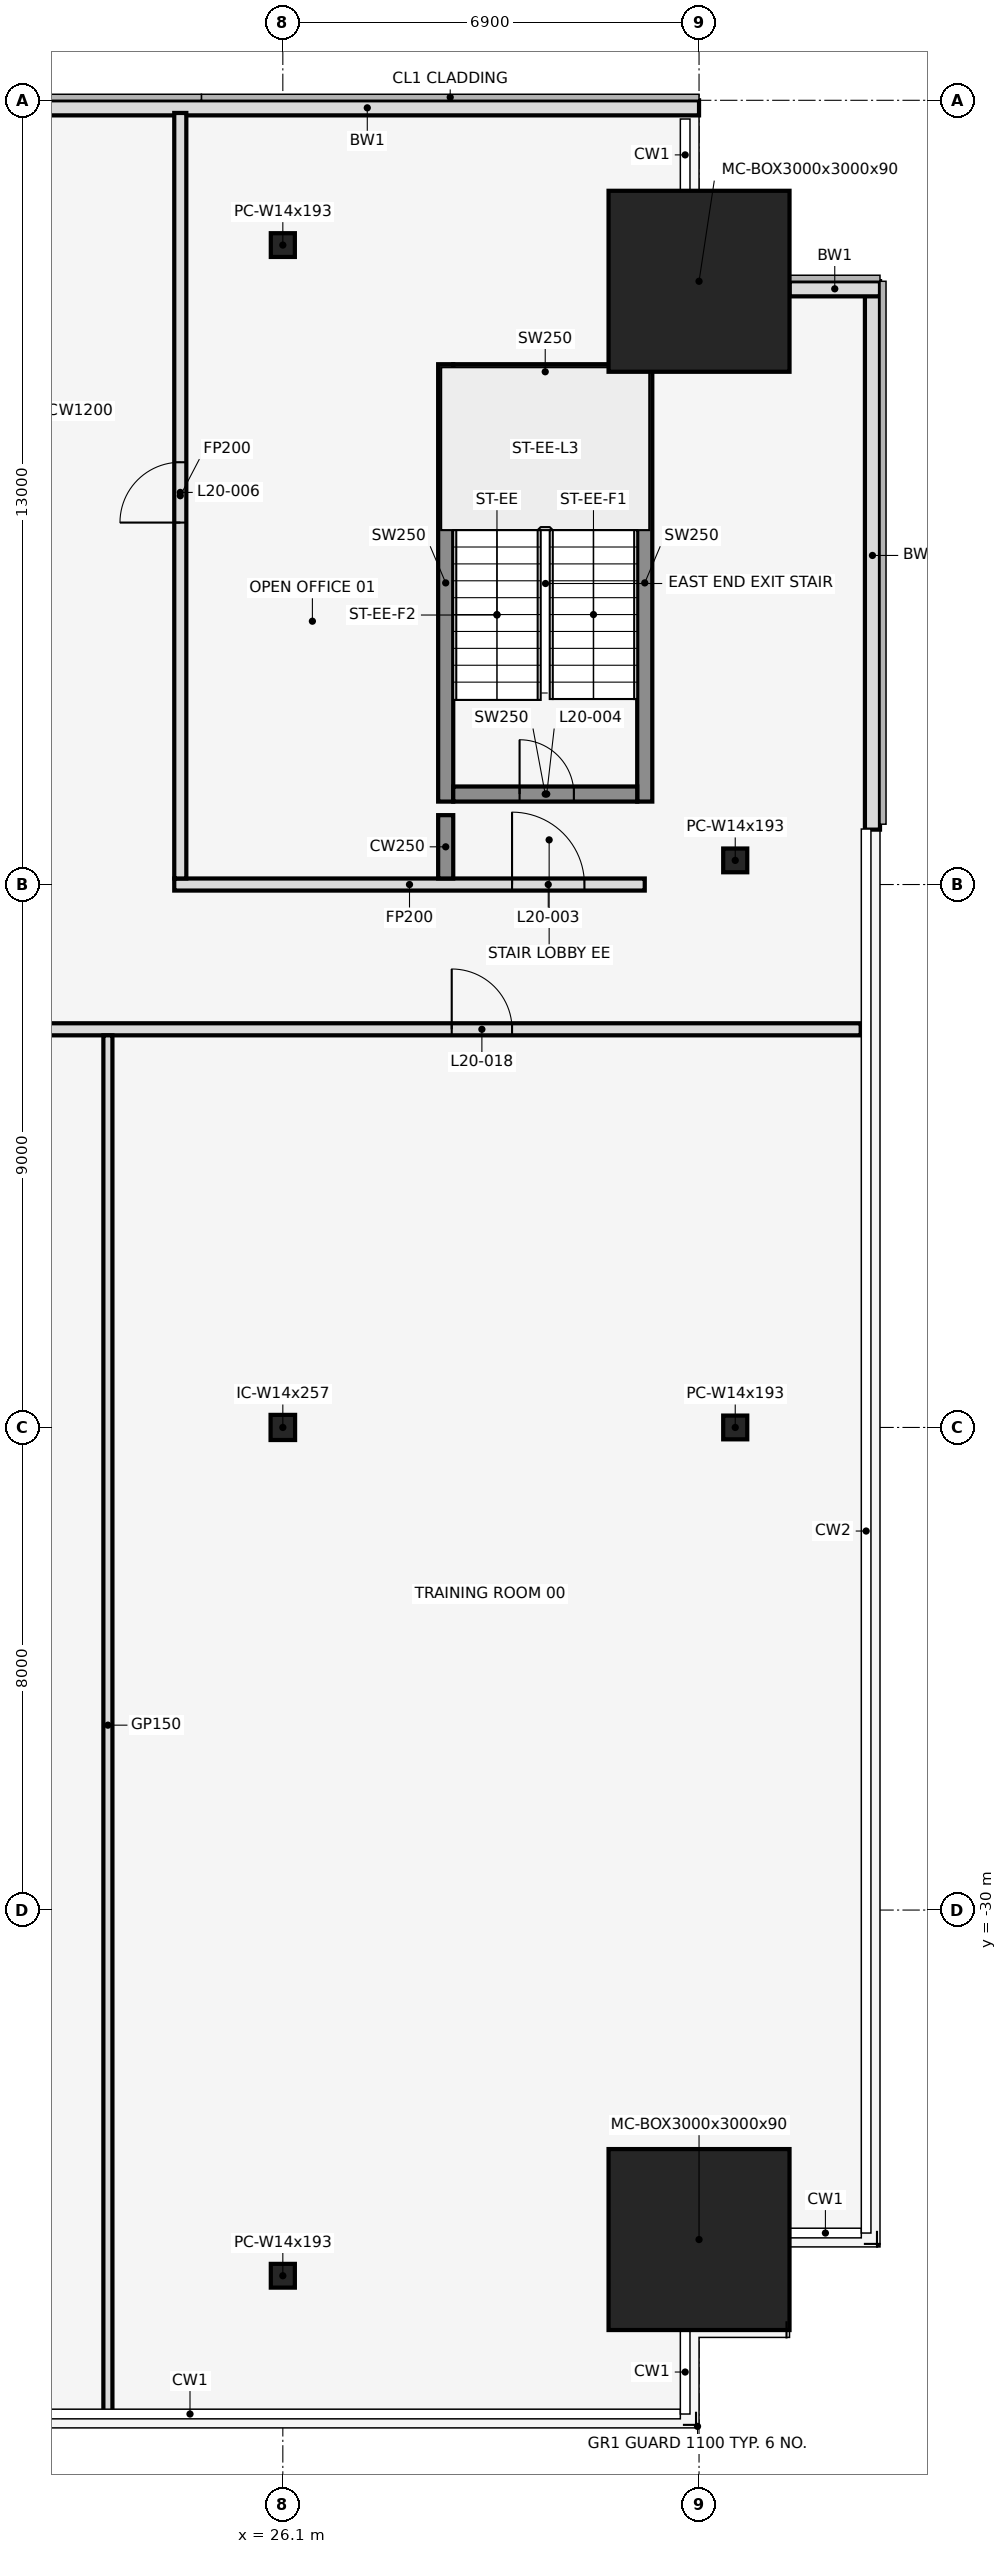
"""IFC4 building model, lengths in metres.
Left out: names, types, materials, properties, quantities, classifications, styles, units other than length and angle.
Written with IfcOpenShell. Run it as: python <this file> out.ifc"""

import sys

from ifc_helpers import new_model, si_unit, direction, frame, frame_2d, origin, origin_2d, place, context, subcontext, project, spatial, rectangle, hollow_rectangle, i_section, extrude, element, fill, save


model = new_model("IFC4")
c1 = context("Model", 3, precision=1e-05, world=origin(), true_north=direction((0.0, 1.0)))
c2 = subcontext(c1, "Body", "Model", "MODEL_VIEW")
j1 = project(units=[si_unit("LENGTHUNIT", "METRE"), si_unit("PLANEANGLEUNIT", "RADIAN")], contexts=[c1])
p1 = place(None, origin())
s1 = spatial("IfcSite", under=j1, at=p1, CompositionType="ELEMENT")
p2 = place(p1, origin())
s2 = spatial("IfcBuilding", under=s1, at=p2, CompositionType="ELEMENT")
p3 = place(p2, frame((0.0, 0.0, 98.1)))
s3 = spatial("IfcBuildingStorey", under=s2, at=p3, CompositionType="ELEMENT", Elevation=98.1)
for number, where, z_axis, x_axis in (
    (1, (26.1, -36.062, 0.0), (0.0, 0.0, 1.0), (1.0, 0.0, 0.0)),
    (2, (26.1, -2.4, 0.0), (0.0, 0.0, 1.0), (1.0, 0.0, 0.0)),
):
    element("IfcColumn", number, at=place(p3, frame(where, z_axis=z_axis, x_axis=x_axis)), inside=s3, PredefinedType="COLUMN", context=c2, shape_type="SweptSolid", body=[
        extrude(i_section(OverallWidth=0.399, OverallDepth=0.394, WebThickness=0.023, FlangeThickness=0.037, at=origin_2d()), origin(), (0.0, 0.0, 1.0), 4.1),
    ])
for number, where, z_axis, x_axis in (
    (3, (33.0, -35.462, 0.0), (0.0, 0.0, 1.0), (1.0, 0.0, 0.0)),
    (4, (33.0, -3.0, 0.0), (0.0, 0.0, 1.0), (1.0, 0.0, 0.0)),
):
    element("IfcColumn", number, at=place(p3, frame(where, z_axis=z_axis, x_axis=x_axis)), inside=s3, PredefinedType="COLUMN", context=c2, shape_type="SweptSolid", body=[
        extrude(hollow_rectangle(XDim=3.0, YDim=3.0, WallThickness=0.09, at=origin_2d()), origin(), (0.0, 0.0, 1.0), 4.1),
    ])
for number, where, z_axis, x_axis in (
    (5, (33.6, -12.6, 0.0), (0.0, 0.0, 1.0), (1.0, 0.0, 0.0)),
    (6, (33.6, -22.0, 0.0), (0.0, 0.0, 1.0), (1.0, 0.0, 0.0)),
):
    element("IfcColumn", number, at=place(p3, frame(where, z_axis=z_axis, x_axis=x_axis)), inside=s3, PredefinedType="COLUMN", context=c2, shape_type="SweptSolid", body=[
        extrude(i_section(OverallWidth=0.399, OverallDepth=0.394, WebThickness=0.023, FlangeThickness=0.037, at=origin_2d()), origin(), (0.0, 0.0, 1.0), 4.1),
    ])
p4 = place(p3, frame((26.1, -22.0, 0.0), z_axis=(0.0, 0.0, 1.0), x_axis=(1.0, 0.0, 0.0)))
e7 = element("IfcColumn", 7, at=p4, inside=s3, PredefinedType="COLUMN", context=c2, shape_type="SweptSolid", body=[
    extrude(i_section(OverallWidth=0.406, OverallDepth=0.417, WebThickness=0.03, FlangeThickness=0.048, at=origin_2d()), origin(), (0.0, 0.0, 1.0), 4.1),
])
p5 = place(p3, frame((33.0, -0.125, 0.0), z_axis=(0.0, 0.0, 1.0), x_axis=(-1.0, 0.0, 0.0)))
e8 = element("IfcWall", 8, at=p5, inside=s3, PredefinedType="STANDARD", context=c2, shape_type="SweptSolid", body=[
    extrude(rectangle(XDim=11.0, YDim=0.25, at=frame_2d((5.5, 0.0))), origin(), (0.0, 0.0, 1.0), 3.95),
])
p6 = place(p3, frame((35.875, -12.09, 0.0), z_axis=(0.0, 0.0, 1.0), x_axis=(0.0, 1.0, 0.0)))
e9 = element("IfcWall", 9, at=p6, inside=s3, PredefinedType="STANDARD", context=c2, shape_type="SweptSolid", body=[
    extrude(rectangle(XDim=9.09, YDim=0.25, at=frame_2d((4.545, 0.0))), origin(), (0.0, 0.0, 1.0), 3.95),
])
p7 = place(p3, frame((36.0, -3.125, 0.0), z_axis=(0.0, 0.0, 1.0), x_axis=(-1.0, 0.0, 0.0)))
e10 = element("IfcWall", 10, at=p7, inside=s3, PredefinedType="STANDARD", context=c2, shape_type="SweptSolid", body=[
    extrude(rectangle(XDim=1.5, YDim=0.25, at=frame_2d((0.75, 0.0))), origin(), (0.0, 0.0, 1.0), 3.95),
])
for number, where, z_axis, x_axis in (
    (11, (28.8, -11.625, 0.0), (0.0, 0.0, 1.0), (0.0, 1.0, 0.0)),
    (12, (32.1, -11.625, 0.0), (0.0, 0.0, 1.0), (0.0, 1.0, 0.0)),
):
    element("IfcWall", number, at=place(p3, frame(where, z_axis=z_axis, x_axis=x_axis)), inside=s3, PredefinedType="SHEAR", context=c2, shape_type="SweptSolid", body=[
        extrude(rectangle(XDim=7.25, YDim=0.25, at=frame_2d((3.625, 0.0))), origin(), (0.0, 0.0, 1.0), 4.1),
    ])
p8 = place(p3, frame((28.925, -11.5, 0.0), z_axis=(0.0, 0.0, 1.0), x_axis=(1.0, 0.0, 0.0)))
e13 = element("IfcWall", 13, at=p8, inside=s3, PredefinedType="SHEAR", context=c2, shape_type="SweptSolid", body=[
    extrude(rectangle(XDim=3.05, YDim=0.25, at=frame_2d((1.525, 0.0))), origin(), (0.0, 0.0, 1.0), 4.1),
])
p9 = place(p8, frame((1.1, 0.0, 0.0)))
e14 = element("IfcOpeningElement", 14, at=p9, cuts=e13, PredefinedType="OPENING", context=c2, shape_type="SweptSolid", body=[
    extrude(rectangle(XDim=0.9, YDim=2.1, at=frame_2d((0.45, 1.05))), frame((0.0, 0.137, 0.0), z_axis=(0.0, -1.0, 0.0), x_axis=(1.0, 0.0, 0.0)), (0.0, 0.0, 1.0), 0.274),
])
p10 = place(p3, frame((28.925, -4.5, 0.0), z_axis=(0.0, 0.0, 1.0), x_axis=(1.0, 0.0, 0.0)))
e15 = element("IfcWall", 15, at=p10, inside=s3, PredefinedType="SHEAR", context=c2, shape_type="SweptSolid", body=[
    extrude(rectangle(XDim=3.05, YDim=0.25, at=frame_2d((1.525, 0.0))), origin(), (0.0, 0.0, 1.0), 4.1),
])
p11 = place(p3, frame((-35.68, -15.4, 0.0), z_axis=(0.0, 0.0, 1.0), x_axis=(1.0, 0.0, 0.0)))
e16 = element("IfcWall", 16, at=p11, inside=s3, PredefinedType="PARTITIONING", context=c2, shape_type="SweptSolid", body=[
    extrude(rectangle(XDim=71.36, YDim=0.2, at=frame_2d((35.68, 0.0))), origin(), (0.0, 0.0, 1.0), 3.018),
])
p12 = place(p11, frame((2.8, 0.0, 0.0)))
e17 = element("IfcOpeningElement", 17, at=p12, cuts=e16, PredefinedType="OPENING", context=c2, shape_type="SweptSolid", body=[
    extrude(rectangle(XDim=1.0, YDim=2.1, at=frame_2d((0.5, 1.05))), frame((0.0, 0.112, 0.0), z_axis=(0.0, -1.0, 0.0), x_axis=(1.0, 0.0, 0.0)), (0.0, 0.0, 1.0), 0.224),
])
p13 = place(p11, frame((7.58, 0.0, 0.0)))
e18 = element("IfcOpeningElement", 18, at=p13, cuts=e16, PredefinedType="OPENING", context=c2, shape_type="SweptSolid", body=[
    extrude(rectangle(XDim=1.0, YDim=2.1, at=frame_2d((0.5, 1.05))), frame((0.0, 0.112, 0.0), z_axis=(0.0, -1.0, 0.0), x_axis=(1.0, 0.0, 0.0)), (0.0, 0.0, 1.0), 0.224),
])
p14 = place(p11, frame((13.48, 0.0, 0.0)))
e19 = element("IfcOpeningElement", 19, at=p14, cuts=e16, PredefinedType="OPENING", context=c2, shape_type="SweptSolid", body=[
    extrude(rectangle(XDim=1.0, YDim=2.1, at=frame_2d((0.5, 1.05))), frame((0.0, 0.112, 0.0), z_axis=(0.0, -1.0, 0.0), x_axis=(1.0, 0.0, 0.0)), (0.0, 0.0, 1.0), 0.224),
])
p15 = place(p11, frame((20.68, 0.0, 0.0)))
e20 = element("IfcOpeningElement", 20, at=p15, cuts=e16, PredefinedType="OPENING", context=c2, shape_type="SweptSolid", body=[
    extrude(rectangle(XDim=1.0, YDim=2.1, at=frame_2d((0.5, 1.05))), frame((0.0, 0.112, 0.0), z_axis=(0.0, -1.0, 0.0), x_axis=(1.0, 0.0, 0.0)), (0.0, 0.0, 1.0), 0.224),
])
p16 = place(p11, frame((29.38, 0.0, 0.0)))
e21 = element("IfcOpeningElement", 21, at=p16, cuts=e16, PredefinedType="OPENING", context=c2, shape_type="SweptSolid", body=[
    extrude(rectangle(XDim=1.0, YDim=2.1, at=frame_2d((0.5, 1.05))), frame((0.0, 0.112, 0.0), z_axis=(0.0, -1.0, 0.0), x_axis=(1.0, 0.0, 0.0)), (0.0, 0.0, 1.0), 0.224),
])
p17 = place(p11, frame((38.08, 0.0, 0.0)))
e22 = element("IfcOpeningElement", 22, at=p17, cuts=e16, PredefinedType="OPENING", context=c2, shape_type="SweptSolid", body=[
    extrude(rectangle(XDim=1.0, YDim=2.1, at=frame_2d((0.5, 1.05))), frame((0.0, 0.112, 0.0), z_axis=(0.0, -1.0, 0.0), x_axis=(1.0, 0.0, 0.0)), (0.0, 0.0, 1.0), 0.224),
])
p18 = place(p11, frame((45.38, 0.0, 0.0)))
e23 = element("IfcOpeningElement", 23, at=p18, cuts=e16, PredefinedType="OPENING", context=c2, shape_type="SweptSolid", body=[
    extrude(rectangle(XDim=0.9, YDim=2.1, at=frame_2d((0.45, 1.05))), frame((0.0, 0.112, 0.0), z_axis=(0.0, -1.0, 0.0), x_axis=(1.0, 0.0, 0.0)), (0.0, 0.0, 1.0), 0.224),
])
p19 = place(p11, frame((54.08, 0.0, 0.0)))
e24 = element("IfcOpeningElement", 24, at=p19, cuts=e16, PredefinedType="OPENING", context=c2, shape_type="SweptSolid", body=[
    extrude(rectangle(XDim=1.0, YDim=2.1, at=frame_2d((0.5, 1.05))), frame((0.0, 0.112, 0.0), z_axis=(0.0, -1.0, 0.0), x_axis=(1.0, 0.0, 0.0)), (0.0, 0.0, 1.0), 0.224),
])
p20 = place(p11, frame((64.58, 0.0, 0.0)))
e25 = element("IfcOpeningElement", 25, at=p20, cuts=e16, PredefinedType="OPENING", context=c2, shape_type="SweptSolid", body=[
    extrude(rectangle(XDim=1.0, YDim=2.1, at=frame_2d((0.5, 1.05))), frame((0.0, 0.112, 0.0), z_axis=(0.0, -1.0, 0.0), x_axis=(1.0, 0.0, 0.0)), (0.0, 0.0, 1.0), 0.224),
])
p21 = place(p3, frame((24.3, -13.0, 0.0), z_axis=(0.0, 0.0, 1.0), x_axis=(1.0, 0.0, 0.0)))
e26 = element("IfcWall", 26, at=p21, inside=s3, PredefinedType="PARTITIONING", context=c2, shape_type="SweptSolid", body=[
    extrude(rectangle(XDim=7.8, YDim=0.2, at=frame_2d((3.9, 0.0))), origin(), (0.0, 0.0, 1.0), 3.018),
])
p22 = place(p21, frame((5.6, 0.0, 0.0)))
e27 = element("IfcOpeningElement", 27, at=p22, cuts=e26, PredefinedType="OPENING", context=c2, shape_type="SweptSolid", body=[
    extrude(rectangle(XDim=1.2, YDim=2.1, at=frame_2d((0.6, 1.05))), frame((0.0, 0.112, 0.0), z_axis=(0.0, -1.0, 0.0), x_axis=(1.0, 0.0, 0.0)), (0.0, 0.0, 1.0), 0.224),
])
p23 = place(p3, frame((23.2, -38.37, 0.0), z_axis=(0.0, 0.0, 1.0), x_axis=(0.0, 1.0, 0.0)))
e28 = element("IfcWall", 28, at=p23, inside=s3, PredefinedType="PARTITIONING", context=c2, shape_type="SweptSolid", body=[
    extrude(rectangle(XDim=22.87, YDim=0.15, at=frame_2d((11.435, 0.0))), origin(), (0.0, 0.0, 1.0), 3.018),
])
p24 = place(p3, frame((24.4, -12.9, 0.0), z_axis=(0.0, 0.0, 1.0), x_axis=(0.0, 1.0, 0.0)))
e29 = element("IfcWall", 29, at=p24, inside=s3, PredefinedType="PARTITIONING", context=c2, shape_type="SweptSolid", body=[
    extrude(rectangle(XDim=12.69, YDim=0.2, at=frame_2d((6.345, 0.0))), origin(), (0.0, 0.0, 1.0), 3.018),
])
p25 = place(p24, frame((5.9, 0.0, 0.0)))
e30 = element("IfcOpeningElement", 30, at=p25, cuts=e29, PredefinedType="OPENING", context=c2, shape_type="SweptSolid", body=[
    extrude(rectangle(XDim=1.0, YDim=2.1, at=frame_2d((0.5, 1.05))), frame((0.0, 0.112, 0.0), z_axis=(0.0, -1.0, 0.0), x_axis=(1.0, 0.0, 0.0)), (0.0, 0.0, 1.0), 0.224),
])
p26 = place(p3, frame((28.8, -12.9, 0.0), z_axis=(0.0, 0.0, 1.0), x_axis=(0.0, 1.0, 0.0)))
e31 = element("IfcWall", 31, at=p26, inside=s3, PredefinedType="SHEAR", context=c2, shape_type="SweptSolid", body=[
    extrude(rectangle(XDim=1.05, YDim=0.25, at=frame_2d((0.525, 0.0))), origin(), (0.0, 0.0, 1.0), 4.1),
])
p27 = place(p22, origin())
e32 = element("IfcDoor", 32, at=p27, inside=s3, OperationType="SINGLE_SWING_RIGHT", PredefinedType="DOOR", context=c2, shape_type="SweptSolid", body=[
    extrude(rectangle(XDim=1.2, YDim=2.1, at=frame_2d((0.6, 1.05))), frame((0.0, 0.025, 0.0), z_axis=(0.0, -1.0, 0.0), x_axis=(1.0, 0.0, 0.0)), (0.0, 0.0, 1.0), 0.05),
])
fill(e27, e32)
p28 = place(p9, origin())
e33 = element("IfcDoor", 33, at=p28, inside=s3, OperationType="SINGLE_SWING_LEFT", PredefinedType="DOOR", context=c2, shape_type="SweptSolid", body=[
    extrude(rectangle(XDim=0.9, YDim=2.1, at=frame_2d((0.45, 1.05))), frame((0.0, 0.025, 0.0), z_axis=(0.0, -1.0, 0.0), x_axis=(1.0, 0.0, 0.0)), (0.0, 0.0, 1.0), 0.05),
])
fill(e14, e33)
p29 = place(p25, frame((1.0, 0.0, 0.0), z_axis=(0.0, 0.0, 1.0), x_axis=(-1.0, 0.0, 0.0)))
e34 = element("IfcDoor", 34, at=p29, inside=s3, OperationType="SINGLE_SWING_RIGHT", PredefinedType="DOOR", context=c2, shape_type="SweptSolid", body=[
    extrude(rectangle(XDim=1.0, YDim=2.1, at=frame_2d((0.5, 1.05))), frame((0.0, 0.025, 0.0), z_axis=(0.0, -1.0, 0.0), x_axis=(1.0, 0.0, 0.0)), (0.0, 0.0, 1.0), 0.05),
])
fill(e30, e34)
p30 = place(p20, frame((1.0, 0.0, 0.0), z_axis=(0.0, 0.0, 1.0), x_axis=(-1.0, 0.0, 0.0)))
e35 = element("IfcDoor", 35, at=p30, inside=s3, OperationType="SINGLE_SWING_RIGHT", PredefinedType="DOOR", context=c2, shape_type="SweptSolid", body=[
    extrude(rectangle(XDim=1.0, YDim=2.1, at=frame_2d((0.5, 1.05))), frame((0.0, 0.025, 0.0), z_axis=(0.0, -1.0, 0.0), x_axis=(1.0, 0.0, 0.0)), (0.0, 0.0, 1.0), 0.05),
])
fill(e25, e35)
save(model, sys.argv[1])
